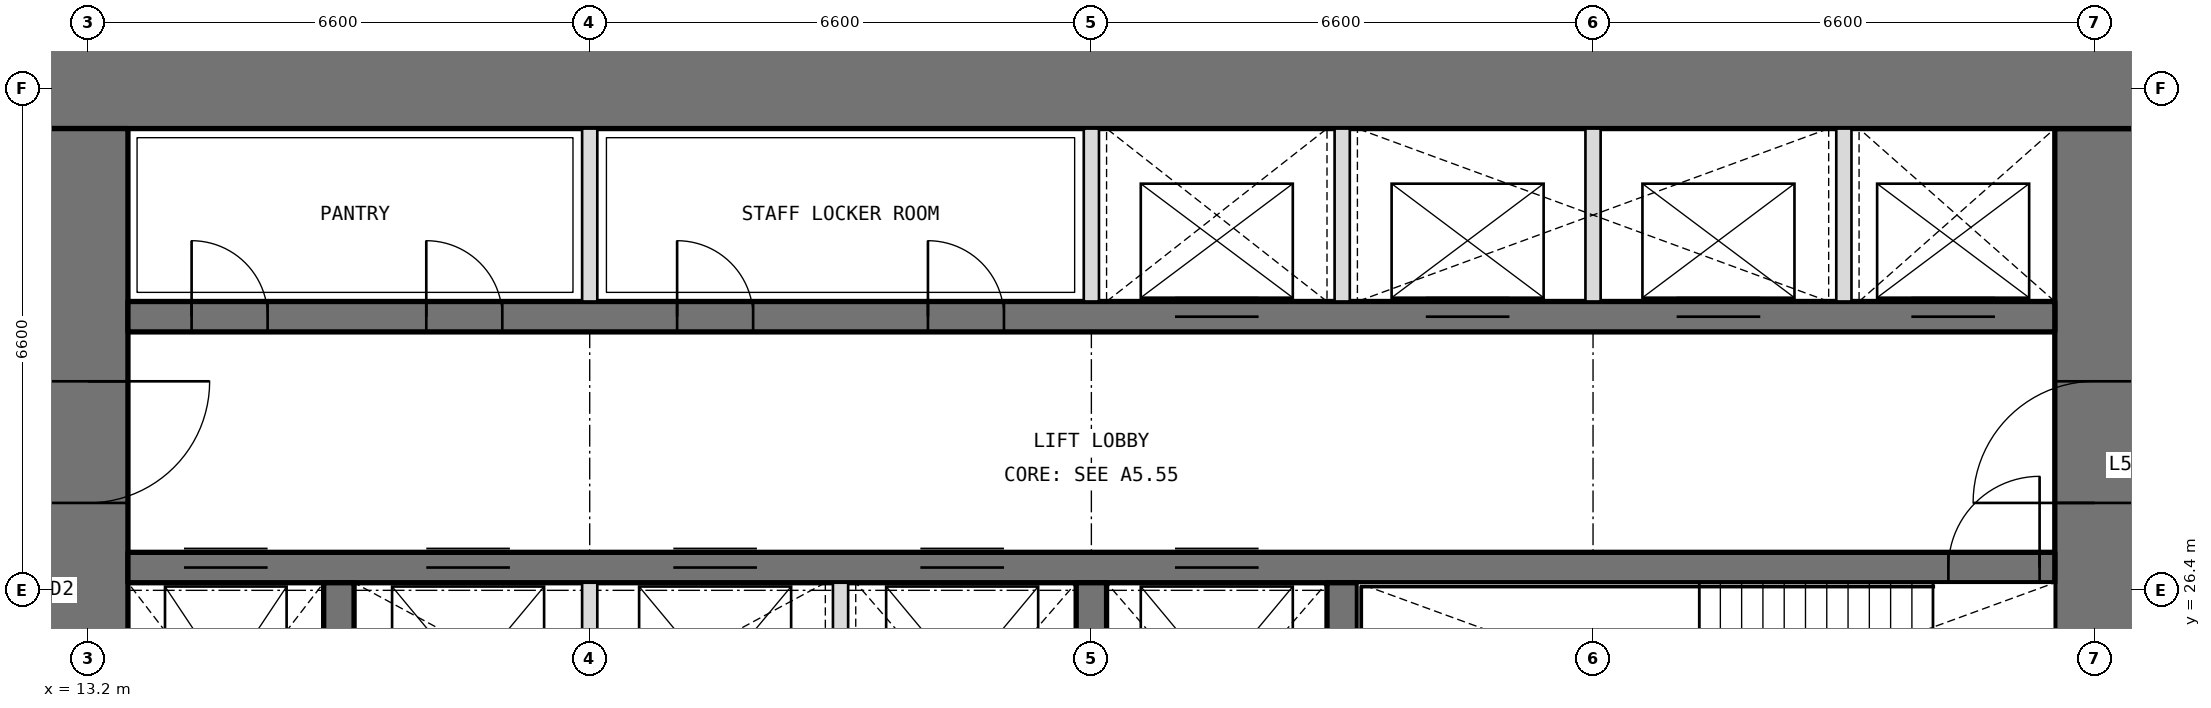
"""IFC4 building model, lengths in metres.
Left out: names, types, materials, properties, quantities, classifications, styles, units other than length and angle.
Written with IfcOpenShell. Run it as: python <this file> out.ifc"""

import sys

from ifc_helpers import new_model, si_unit, direction, frame, frame_2d, origin, place, context, subcontext, project, spatial, rectangle, extrude, element, fill, save


model = new_model("IFC4")
c1 = context("Model", 3, precision=1e-05, world=origin(), true_north=direction((0.0, 1.0)))
c2 = subcontext(c1, "Body", "Model", "MODEL_VIEW")
j1 = project(units=[si_unit("LENGTHUNIT", "METRE"), si_unit("PLANEANGLEUNIT", "RADIAN")], contexts=[c1])
p1 = place(None, origin())
s1 = spatial("IfcSite", under=j1, at=p1, CompositionType="ELEMENT")
p2 = place(p1, origin())
s2 = spatial("IfcBuilding", under=s1, at=p2, CompositionType="ELEMENT")
p3 = place(p2, frame((0.0, 0.0, 233.4)))
s3 = spatial("IfcBuildingStorey", under=s2, at=p3, CompositionType="ELEMENT", Elevation=233.4)
p4 = place(p3, frame((39.6, 13.725, 0.0), z_axis=(0.0, 0.0, 1.0), x_axis=(0.0, 1.0, 0.0)))
e1 = element("IfcWall", 1, at=p4, inside=s3, PredefinedType="SHEAR", context=c2, shape_type="SweptSolid", body=[
    extrude(rectangle(XDim=18.75, YDim=1.05, at=frame_2d((9.375, 0.0))), origin(), (0.0, 0.0, 1.0), 4.2),
])
p5 = place(p4, frame((3.025, 0.0, 0.0)))
e2 = element("IfcOpeningElement", 2, at=p5, cuts=e1, PredefinedType="OPENING", context=c2, shape_type="SweptSolid", body=[
    extrude(rectangle(XDim=1.6, YDim=2.1, at=frame_2d((0.8, 1.05))), frame((0.0, 0.535, 0.0), z_axis=(0.0, -1.0, 0.0), x_axis=(1.0, 0.0, 0.0)), (0.0, 0.0, 1.0), 1.07),
])
p6 = place(p4, frame((13.825, 0.0, 0.0)))
e3 = element("IfcOpeningElement", 3, at=p6, cuts=e1, PredefinedType="OPENING", context=c2, shape_type="SweptSolid", body=[
    extrude(rectangle(XDim=1.6, YDim=2.1, at=frame_2d((0.8, 1.05))), frame((0.0, 0.535, 0.0), z_axis=(0.0, -1.0, 0.0), x_axis=(1.0, 0.0, 0.0)), (0.0, 0.0, 1.0), 1.07),
])
p7 = place(p3, frame((40.125, 33.0, 0.0), z_axis=(0.0, 0.0, 1.0), x_axis=(-1.0, 0.0, 0.0)))
e4 = element("IfcWall", 4, at=p7, inside=s3, PredefinedType="SHEAR", context=c2, shape_type="SweptSolid", body=[
    extrude(rectangle(XDim=27.45, YDim=1.05, at=frame_2d((13.725, 0.0))), origin(), (0.0, 0.0, 1.0), 4.2),
])
p8 = place(p3, frame((13.2, 32.475, 0.0), z_axis=(0.0, 0.0, 1.0), x_axis=(0.0, -1.0, 0.0)))
e5 = element("IfcWall", 5, at=p8, inside=s3, PredefinedType="SHEAR", context=c2, shape_type="SweptSolid", body=[
    extrude(rectangle(XDim=18.75, YDim=1.05, at=frame_2d((9.375, 0.0))), origin(), (0.0, 0.0, 1.0), 4.2),
])
p9 = place(p8, frame((14.125, 0.0, 0.0)))
e6 = element("IfcOpeningElement", 6, at=p9, cuts=e5, PredefinedType="OPENING", context=c2, shape_type="SweptSolid", body=[
    extrude(rectangle(XDim=1.6, YDim=2.1, at=frame_2d((0.8, 1.05))), frame((0.0, 0.535, 0.0), z_axis=(0.0, -1.0, 0.0), x_axis=(1.0, 0.0, 0.0)), (0.0, 0.0, 1.0), 1.07),
])
p10 = place(p8, frame((3.325, 0.0, 0.0)))
e7 = element("IfcOpeningElement", 7, at=p10, cuts=e5, PredefinedType="OPENING", context=c2, shape_type="SweptSolid", body=[
    extrude(rectangle(XDim=1.6, YDim=2.1, at=frame_2d((0.8, 1.05))), frame((0.0, 0.535, 0.0), z_axis=(0.0, -1.0, 0.0), x_axis=(1.0, 0.0, 0.0)), (0.0, 0.0, 1.0), 1.07),
])
p11 = place(p3, frame((13.725, 26.7, 0.0), z_axis=(0.0, 0.0, 1.0), x_axis=(1.0, 0.0, 0.0)))
e8 = element("IfcWall", 8, at=p11, inside=s3, PredefinedType="SHEAR", context=c2, shape_type="SweptSolid", body=[
    extrude(rectangle(XDim=25.35, YDim=0.4, at=frame_2d((12.675, 0.0))), origin(), (0.0, 0.0, 1.0), 4.2),
])
p12 = place(p11, frame((23.95, 0.0, 0.0)))
e9 = element("IfcOpeningElement", 9, at=p12, cuts=e8, PredefinedType="OPENING", context=c2, shape_type="SweptSolid", body=[
    extrude(rectangle(XDim=1.2, YDim=2.1, at=frame_2d((0.6, 1.05))), frame((0.0, 0.21, 0.0), z_axis=(0.0, -1.0, 0.0), x_axis=(1.0, 0.0, 0.0)), (0.0, 0.0, 1.0), 0.42),
])
p13 = place(p11, frame((0.738, 0.0, 0.0)))
e10 = element("IfcOpeningElement", 10, at=p13, cuts=e8, PredefinedType="OPENING", context=c2, shape_type="SweptSolid", body=[
    extrude(rectangle(XDim=1.1, YDim=2.1, at=frame_2d((0.55, 1.05))), frame((0.0, 0.21, 0.0), z_axis=(0.0, -1.0, 0.0), x_axis=(1.0, 0.0, 0.0)), (0.0, 0.0, 1.0), 0.42),
])
p14 = place(p11, frame((3.925, 0.0, 0.0)))
e11 = element("IfcOpeningElement", 11, at=p14, cuts=e8, PredefinedType="OPENING", context=c2, shape_type="SweptSolid", body=[
    extrude(rectangle(XDim=1.1, YDim=2.1, at=frame_2d((0.55, 1.05))), frame((0.0, 0.21, 0.0), z_axis=(0.0, -1.0, 0.0), x_axis=(1.0, 0.0, 0.0)), (0.0, 0.0, 1.0), 0.42),
])
p15 = place(p11, frame((7.175, 0.0, 0.0)))
e12 = element("IfcOpeningElement", 12, at=p15, cuts=e8, PredefinedType="OPENING", context=c2, shape_type="SweptSolid", body=[
    extrude(rectangle(XDim=1.1, YDim=2.1, at=frame_2d((0.55, 1.05))), frame((0.0, 0.21, 0.0), z_axis=(0.0, -1.0, 0.0), x_axis=(1.0, 0.0, 0.0)), (0.0, 0.0, 1.0), 0.42),
])
p16 = place(p11, frame((10.425, 0.0, 0.0)))
e13 = element("IfcOpeningElement", 13, at=p16, cuts=e8, PredefinedType="OPENING", context=c2, shape_type="SweptSolid", body=[
    extrude(rectangle(XDim=1.1, YDim=2.1, at=frame_2d((0.55, 1.05))), frame((0.0, 0.21, 0.0), z_axis=(0.0, -1.0, 0.0), x_axis=(1.0, 0.0, 0.0)), (0.0, 0.0, 1.0), 0.42),
])
p17 = place(p11, frame((13.775, 0.0, 0.0)))
e14 = element("IfcOpeningElement", 14, at=p17, cuts=e8, PredefinedType="OPENING", context=c2, shape_type="SweptSolid", body=[
    extrude(rectangle(XDim=1.1, YDim=2.1, at=frame_2d((0.55, 1.05))), frame((0.0, 0.21, 0.0), z_axis=(0.0, -1.0, 0.0), x_axis=(1.0, 0.0, 0.0)), (0.0, 0.0, 1.0), 0.42),
])
p18 = place(p3, frame((13.725, 30.0, 0.0), z_axis=(0.0, 0.0, 1.0), x_axis=(1.0, 0.0, 0.0)))
e15 = element("IfcWall", 15, at=p18, inside=s3, PredefinedType="SHEAR", context=c2, shape_type="SweptSolid", body=[
    extrude(rectangle(XDim=25.35, YDim=0.4, at=frame_2d((12.675, 0.0))), origin(), (0.0, 0.0, 1.0), 4.2),
])
p19 = place(p18, frame((0.837, 0.0, 0.0)))
e16 = element("IfcOpeningElement", 16, at=p19, cuts=e15, PredefinedType="OPENING", context=c2, shape_type="SweptSolid", body=[
    extrude(rectangle(XDim=1.0, YDim=2.1, at=frame_2d((0.5, 1.05))), frame((0.0, 0.21, 0.0), z_axis=(0.0, -1.0, 0.0), x_axis=(1.0, 0.0, 0.0)), (0.0, 0.0, 1.0), 0.42),
])
p20 = place(p18, frame((3.925, 0.0, 0.0)))
e17 = element("IfcOpeningElement", 17, at=p20, cuts=e15, PredefinedType="OPENING", context=c2, shape_type="SweptSolid", body=[
    extrude(rectangle(XDim=1.0, YDim=2.1, at=frame_2d((0.5, 1.05))), frame((0.0, 0.21, 0.0), z_axis=(0.0, -1.0, 0.0), x_axis=(1.0, 0.0, 0.0)), (0.0, 0.0, 1.0), 0.42),
])
p21 = place(p18, frame((7.225, 0.0, 0.0)))
e18 = element("IfcOpeningElement", 18, at=p21, cuts=e15, PredefinedType="OPENING", context=c2, shape_type="SweptSolid", body=[
    extrude(rectangle(XDim=1.0, YDim=2.1, at=frame_2d((0.5, 1.05))), frame((0.0, 0.21, 0.0), z_axis=(0.0, -1.0, 0.0), x_axis=(1.0, 0.0, 0.0)), (0.0, 0.0, 1.0), 0.42),
])
p22 = place(p18, frame((10.525, 0.0, 0.0)))
e19 = element("IfcOpeningElement", 19, at=p22, cuts=e15, PredefinedType="OPENING", context=c2, shape_type="SweptSolid", body=[
    extrude(rectangle(XDim=1.0, YDim=2.1, at=frame_2d((0.5, 1.05))), frame((0.0, 0.21, 0.0), z_axis=(0.0, -1.0, 0.0), x_axis=(1.0, 0.0, 0.0)), (0.0, 0.0, 1.0), 0.42),
])
p23 = place(p18, frame((13.775, 0.0, 0.0)))
e20 = element("IfcOpeningElement", 20, at=p23, cuts=e15, PredefinedType="OPENING", context=c2, shape_type="SweptSolid", body=[
    extrude(rectangle(XDim=1.1, YDim=2.1, at=frame_2d((0.55, 1.05))), frame((0.0, 0.21, 0.0), z_axis=(0.0, -1.0, 0.0), x_axis=(1.0, 0.0, 0.0)), (0.0, 0.0, 1.0), 0.42),
])
p24 = place(p18, frame((17.075, 0.0, 0.0)))
e21 = element("IfcOpeningElement", 21, at=p24, cuts=e15, PredefinedType="OPENING", context=c2, shape_type="SweptSolid", body=[
    extrude(rectangle(XDim=1.1, YDim=2.1, at=frame_2d((0.55, 1.05))), frame((0.0, 0.21, 0.0), z_axis=(0.0, -1.0, 0.0), x_axis=(1.0, 0.0, 0.0)), (0.0, 0.0, 1.0), 0.42),
])
p25 = place(p18, frame((20.375, 0.0, 0.0)))
e22 = element("IfcOpeningElement", 22, at=p25, cuts=e15, PredefinedType="OPENING", context=c2, shape_type="SweptSolid", body=[
    extrude(rectangle(XDim=1.1, YDim=2.1, at=frame_2d((0.55, 1.05))), frame((0.0, 0.21, 0.0), z_axis=(0.0, -1.0, 0.0), x_axis=(1.0, 0.0, 0.0)), (0.0, 0.0, 1.0), 0.42),
])
p26 = place(p18, frame((23.462, 0.0, 0.0)))
e23 = element("IfcOpeningElement", 23, at=p26, cuts=e15, PredefinedType="OPENING", context=c2, shape_type="SweptSolid", body=[
    extrude(rectangle(XDim=1.1, YDim=2.1, at=frame_2d((0.55, 1.05))), frame((0.0, 0.21, 0.0), z_axis=(0.0, -1.0, 0.0), x_axis=(1.0, 0.0, 0.0)), (0.0, 0.0, 1.0), 0.42),
])
for number, where, z_axis, x_axis in (
    (24, (16.5, 23.15, 0.0), (0.0, 0.0, 1.0), (0.0, 1.0, 0.0)),
    (25, (26.4, 23.15, 0.0), (0.0, 0.0, 1.0), (0.0, 1.0, 0.0)),
    (26, (29.7, 23.15, 0.0), (0.0, 0.0, 1.0), (0.0, 1.0, 0.0)),
):
    element("IfcWall", number, at=place(p3, frame(where, z_axis=z_axis, x_axis=x_axis)), inside=s3, PredefinedType="SHEAR", context=c2, shape_type="SweptSolid", body=[
        extrude(rectangle(XDim=3.35, YDim=0.4, at=frame_2d((1.675, 0.0))), origin(), (0.0, 0.0, 1.0), 4.2),
    ])
for number, where, z_axis, x_axis in (
    (27, (19.8, 30.2, 0.0), (0.0, 0.0, 1.0), (0.0, 1.0, 0.0)),
    (28, (26.4, 30.2, 0.0), (0.0, 0.0, 1.0), (0.0, 1.0, 0.0)),
    (29, (29.7, 30.2, 0.0), (0.0, 0.0, 1.0), (0.0, 1.0, 0.0)),
    (30, (33.0, 30.2, 0.0), (0.0, 0.0, 1.0), (0.0, 1.0, 0.0)),
    (31, (36.3, 30.2, 0.0), (0.0, 0.0, 1.0), (0.0, 1.0, 0.0)),
):
    element("IfcWall", number, at=place(p3, frame(where, z_axis=z_axis, x_axis=x_axis)), inside=s3, PredefinedType="PARTITIONING", context=c2, shape_type="SweptSolid", body=[
        extrude(rectangle(XDim=2.275, YDim=0.2, at=frame_2d((1.138, 0.0))), origin(), (0.0, 0.0, 1.0), 4.2),
    ])
for number, where, z_axis, x_axis in (
    (32, (19.8, 23.15, 0.0), (0.0, 0.0, 1.0), (0.0, 1.0, 0.0)),
    (33, (23.1, 23.15, 0.0), (0.0, 0.0, 1.0), (0.0, 1.0, 0.0)),
):
    element("IfcWall", number, at=place(p3, frame(where, z_axis=z_axis, x_axis=x_axis)), inside=s3, PredefinedType="PARTITIONING", context=c2, shape_type="SweptSolid", body=[
        extrude(rectangle(XDim=3.35, YDim=0.2, at=frame_2d((1.675, 0.0))), origin(), (0.0, 0.0, 1.0), 4.2),
    ])
p27 = place(p19, origin())
e34 = element("IfcDoor", 34, at=p27, inside=s3, OperationType="SINGLE_SWING_LEFT", PredefinedType="DOOR", context=c2, shape_type="SweptSolid", body=[
    extrude(rectangle(XDim=1.0, YDim=2.1, at=frame_2d((0.5, 1.05))), frame((0.0, 0.025, 0.0), z_axis=(0.0, -1.0, 0.0), x_axis=(1.0, 0.0, 0.0)), (0.0, 0.0, 1.0), 0.05),
])
fill(e16, e34)
p28 = place(p20, origin())
e35 = element("IfcDoor", 35, at=p28, inside=s3, OperationType="SINGLE_SWING_LEFT", PredefinedType="DOOR", context=c2, shape_type="SweptSolid", body=[
    extrude(rectangle(XDim=1.0, YDim=2.1, at=frame_2d((0.5, 1.05))), frame((0.0, 0.025, 0.0), z_axis=(0.0, -1.0, 0.0), x_axis=(1.0, 0.0, 0.0)), (0.0, 0.0, 1.0), 0.05),
])
fill(e17, e35)
p29 = place(p21, origin())
e36 = element("IfcDoor", 36, at=p29, inside=s3, OperationType="SINGLE_SWING_LEFT", PredefinedType="DOOR", context=c2, shape_type="SweptSolid", body=[
    extrude(rectangle(XDim=1.0, YDim=2.1, at=frame_2d((0.5, 1.05))), frame((0.0, 0.025, 0.0), z_axis=(0.0, -1.0, 0.0), x_axis=(1.0, 0.0, 0.0)), (0.0, 0.0, 1.0), 0.05),
])
fill(e18, e36)
p30 = place(p22, origin())
e37 = element("IfcDoor", 37, at=p30, inside=s3, OperationType="SINGLE_SWING_LEFT", PredefinedType="DOOR", context=c2, shape_type="SweptSolid", body=[
    extrude(rectangle(XDim=1.0, YDim=2.1, at=frame_2d((0.5, 1.05))), frame((0.0, 0.025, 0.0), z_axis=(0.0, -1.0, 0.0), x_axis=(1.0, 0.0, 0.0)), (0.0, 0.0, 1.0), 0.05),
])
fill(e19, e37)
p31 = place(p12, origin())
e38 = element("IfcDoor", 38, at=p31, inside=s3, OperationType="SINGLE_SWING_RIGHT", PredefinedType="DOOR", context=c2, shape_type="SweptSolid", body=[
    extrude(rectangle(XDim=1.2, YDim=2.1, at=frame_2d((0.6, 1.05))), frame((0.0, 0.025, 0.0), z_axis=(0.0, -1.0, 0.0), x_axis=(1.0, 0.0, 0.0)), (0.0, 0.0, 1.0), 0.05),
])
fill(e9, e38)
p32 = place(p10, origin())
e39 = element("IfcDoor", 39, at=p32, inside=s3, OperationType="DOUBLE_DOOR_DOUBLE_SWING", PredefinedType="DOOR", context=c2, shape_type="SweptSolid", body=[
    extrude(rectangle(XDim=1.6, YDim=2.1, at=frame_2d((0.8, 1.05))), frame((0.0, 0.025, 0.0), z_axis=(0.0, -1.0, 0.0), x_axis=(1.0, 0.0, 0.0)), (0.0, 0.0, 1.0), 0.05),
])
fill(e7, e39)
p33 = place(p6, origin())
e40 = element("IfcDoor", 40, at=p33, inside=s3, OperationType="DOUBLE_DOOR_DOUBLE_SWING", PredefinedType="DOOR", context=c2, shape_type="SweptSolid", body=[
    extrude(rectangle(XDim=1.6, YDim=2.1, at=frame_2d((0.8, 1.05))), frame((0.0, 0.025, 0.0), z_axis=(0.0, -1.0, 0.0), x_axis=(1.0, 0.0, 0.0)), (0.0, 0.0, 1.0), 0.05),
])
fill(e3, e40)
p34 = place(p23, origin())
e41 = element("IfcDoor", 41, at=p34, inside=s3, OperationType="DOUBLE_DOOR_SLIDING", PredefinedType="DOOR", context=c2, shape_type="SweptSolid", body=[
    extrude(rectangle(XDim=1.1, YDim=2.1, at=frame_2d((0.55, 1.05))), frame((0.0, 0.025, 0.0), z_axis=(0.0, -1.0, 0.0), x_axis=(1.0, 0.0, 0.0)), (0.0, 0.0, 1.0), 0.05),
])
fill(e20, e41)
p35 = place(p24, origin())
e42 = element("IfcDoor", 42, at=p35, inside=s3, OperationType="DOUBLE_DOOR_SLIDING", PredefinedType="DOOR", context=c2, shape_type="SweptSolid", body=[
    extrude(rectangle(XDim=1.1, YDim=2.1, at=frame_2d((0.55, 1.05))), frame((0.0, 0.025, 0.0), z_axis=(0.0, -1.0, 0.0), x_axis=(1.0, 0.0, 0.0)), (0.0, 0.0, 1.0), 0.05),
])
fill(e21, e42)
p36 = place(p25, origin())
e43 = element("IfcDoor", 43, at=p36, inside=s3, OperationType="DOUBLE_DOOR_SLIDING", PredefinedType="DOOR", context=c2, shape_type="SweptSolid", body=[
    extrude(rectangle(XDim=1.1, YDim=2.1, at=frame_2d((0.55, 1.05))), frame((0.0, 0.025, 0.0), z_axis=(0.0, -1.0, 0.0), x_axis=(1.0, 0.0, 0.0)), (0.0, 0.0, 1.0), 0.05),
])
fill(e22, e43)
p37 = place(p26, origin())
e44 = element("IfcDoor", 44, at=p37, inside=s3, OperationType="DOUBLE_DOOR_SLIDING", PredefinedType="DOOR", context=c2, shape_type="SweptSolid", body=[
    extrude(rectangle(XDim=1.1, YDim=2.1, at=frame_2d((0.55, 1.05))), frame((0.0, 0.025, 0.0), z_axis=(0.0, -1.0, 0.0), x_axis=(1.0, 0.0, 0.0)), (0.0, 0.0, 1.0), 0.05),
])
fill(e23, e44)
p38 = place(p13, origin())
e45 = element("IfcDoor", 45, at=p38, inside=s3, OperationType="DOUBLE_DOOR_SLIDING", PredefinedType="DOOR", context=c2, shape_type="SweptSolid", body=[
    extrude(rectangle(XDim=1.1, YDim=2.1, at=frame_2d((0.55, 1.05))), frame((0.0, 0.025, 0.0), z_axis=(0.0, -1.0, 0.0), x_axis=(1.0, 0.0, 0.0)), (0.0, 0.0, 1.0), 0.05),
])
fill(e10, e45)
p39 = place(p14, origin())
e46 = element("IfcDoor", 46, at=p39, inside=s3, OperationType="DOUBLE_DOOR_SLIDING", PredefinedType="DOOR", context=c2, shape_type="SweptSolid", body=[
    extrude(rectangle(XDim=1.1, YDim=2.1, at=frame_2d((0.55, 1.05))), frame((0.0, 0.025, 0.0), z_axis=(0.0, -1.0, 0.0), x_axis=(1.0, 0.0, 0.0)), (0.0, 0.0, 1.0), 0.05),
])
fill(e11, e46)
p40 = place(p15, origin())
e47 = element("IfcDoor", 47, at=p40, inside=s3, OperationType="DOUBLE_DOOR_SLIDING", PredefinedType="DOOR", context=c2, shape_type="SweptSolid", body=[
    extrude(rectangle(XDim=1.1, YDim=2.1, at=frame_2d((0.55, 1.05))), frame((0.0, 0.025, 0.0), z_axis=(0.0, -1.0, 0.0), x_axis=(1.0, 0.0, 0.0)), (0.0, 0.0, 1.0), 0.05),
])
fill(e12, e47)
p41 = place(p16, origin())
e48 = element("IfcDoor", 48, at=p41, inside=s3, OperationType="DOUBLE_DOOR_SLIDING", PredefinedType="DOOR", context=c2, shape_type="SweptSolid", body=[
    extrude(rectangle(XDim=1.1, YDim=2.1, at=frame_2d((0.55, 1.05))), frame((0.0, 0.025, 0.0), z_axis=(0.0, -1.0, 0.0), x_axis=(1.0, 0.0, 0.0)), (0.0, 0.0, 1.0), 0.05),
])
fill(e13, e48)
p42 = place(p17, origin())
e49 = element("IfcDoor", 49, at=p42, inside=s3, OperationType="DOUBLE_DOOR_SLIDING", PredefinedType="DOOR", context=c2, shape_type="SweptSolid", body=[
    extrude(rectangle(XDim=1.1, YDim=2.1, at=frame_2d((0.55, 1.05))), frame((0.0, 0.025, 0.0), z_axis=(0.0, -1.0, 0.0), x_axis=(1.0, 0.0, 0.0)), (0.0, 0.0, 1.0), 0.05),
])
fill(e14, e49)
save(model, sys.argv[1])
